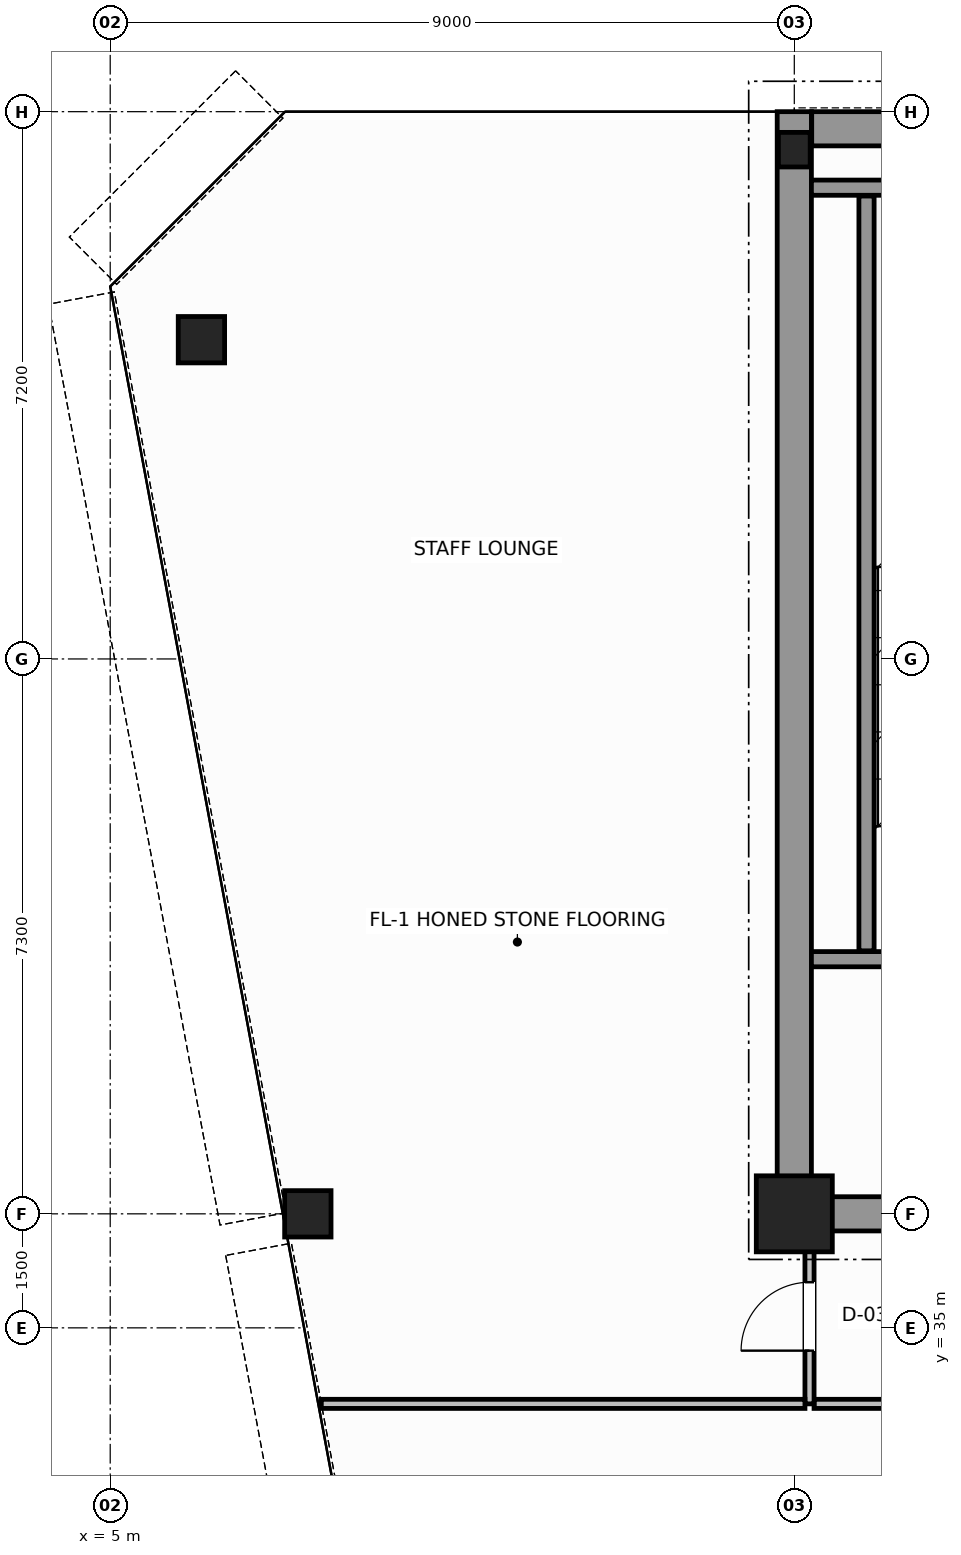
"""IFC4 building model, lengths in metres.
Left out: names, types, materials, properties, quantities, classifications, styles, units other than length and angle.
Written with IfcOpenShell. Run it as: python <this file> out.ifc"""

import sys

from ifc_helpers import new_model, si_unit, direction, frame, frame_2d, origin, origin_2d, place, context, subcontext, project, spatial, rectangle, hollow_circle, i_section, extrude, source, transform, mapped, element, fill, save


model = new_model("IFC4")
c1 = context("Model", 3, precision=1e-05, world=origin(), true_north=direction((0.0, 1.0)))
c2 = subcontext(c1, "Body", "Model", "MODEL_VIEW")
j1 = project(units=[si_unit("LENGTHUNIT", "METRE"), si_unit("PLANEANGLEUNIT", "RADIAN")], contexts=[c1])
p1 = place(None, origin())
s1 = spatial("IfcSite", under=j1, at=p1, CompositionType="ELEMENT")
p2 = place(p1, origin())
s2 = spatial("IfcBuilding", under=s1, at=p2, CompositionType="ELEMENT")
p3 = place(p2, frame((0.0, 0.0, 246.0)))
s3 = spatial("IfcBuildingStorey", under=s2, at=p3, CompositionType="ELEMENT", Elevation=246.0)
m1 = source(origin(), c2, "Body", "SweptSolid", [
    extrude(rectangle(XDim=1.0, YDim=1.0, at=origin_2d()), origin(), (0.0, 0.0, 1.0), 3.8),
])
p4 = place(p3, frame((14.0, 36.5, 0.0), z_axis=(0.0, 0.0, 1.0), x_axis=(1.0, 0.0, 0.0)))
e1 = element("IfcColumn", 1, at=p4, inside=s3, PredefinedType="COLUMN", context=c2, shape_type="MappedRepresentation", body=[
    mapped(m1, transform((0.0, 0.0, 0.0), scale=1.0)),
])
m2 = source(origin(), c2, "Body", "SweptSolid", [
    extrude(i_section(OverallWidth=0.418, OverallDepth=0.455, WebThickness=0.042, FlangeThickness=0.058, FilletRadius=0.015, at=origin_2d()), origin(), (0.0, 0.0, 1.0), 3.8),
])
p5 = place(p3, frame((14.0, 50.5, 0.0), z_axis=(0.0, 0.0, 1.0), x_axis=(1.0, 0.0, 0.0)))
e2 = element("IfcColumn", 2, at=p5, inside=s3, PredefinedType="COLUMN", context=c2, shape_type="MappedRepresentation", body=[
    mapped(m2, transform((0.0, 0.0, 0.0), scale=1.0)),
])
m3 = source(origin(), c2, "Body", "SweptSolid", [
    extrude(hollow_circle(Radius=0.305, WallThickness=0.03, at=origin_2d()), origin(), (0.0, 0.0, 1.0), 3.8),
])
for number, where, z_axis, x_axis in (
    (3, (6.2, 48.0, 0.0), (0.0, 0.0, 1.0), (1.0, 0.0, 0.0)),
    (4, (7.6, 36.5, 0.0), (0.0, 0.0, 1.0), (1.0, 0.0, 0.0)),
):
    element("IfcColumn", number, at=place(p3, frame(where, z_axis=z_axis, x_axis=x_axis)), inside=s3, PredefinedType="COLUMN", context=c2, shape_type="MappedRepresentation", body=[
        mapped(m3, transform((0.0, 0.0, 0.0), scale=1.0)),
    ])
p6 = place(p3, frame((14.229, 50.775, 0.0), z_axis=(0.0, 0.0, 1.0), x_axis=(1.0, 0.0, 0.0)))
e5 = element("IfcWall", 5, at=p6, inside=s3, PredefinedType="SHEAR", context=c2, shape_type="SweptSolid", body=[
    extrude(rectangle(XDim=19.769, YDim=0.45, at=frame_2d((9.885, 0.0))), origin(), (0.0, 0.0, 1.0), 3.8),
])
p7 = place(p3, frame((14.0, 36.5, 0.0), z_axis=(0.0, 0.0, 1.0), x_axis=(0.0, 1.0, 0.0)))
e6 = element("IfcWall", 6, at=p7, inside=s3, PredefinedType="SHEAR", context=c2, shape_type="SweptSolid", body=[
    extrude(rectangle(XDim=14.5, YDim=0.45, at=frame_2d((7.25, 0.0))), origin(), (0.0, 0.0, 1.0), 3.8),
])
p8 = place(p3, frame((14.245, 36.5, 0.0), z_axis=(0.0, 0.0, 1.0), x_axis=(1.0, 0.0, 0.0)))
e7 = element("IfcWall", 7, at=p8, inside=s3, PredefinedType="SHEAR", context=c2, shape_type="SweptSolid", body=[
    extrude(rectangle(XDim=3.955, YDim=0.45, at=frame_2d((1.978, 0.0))), origin(), (0.0, 0.0, 1.0), 2.58),
])
p9 = place(p3, frame((14.225, 39.85, 0.0), z_axis=(0.0, 0.0, 1.0), x_axis=(1.0, 0.0, 0.0)))
e8 = element("IfcWall", 8, at=p9, inside=s3, PredefinedType="SOLIDWALL", context=c2, shape_type="SweptSolid", body=[
    extrude(rectangle(XDim=4.375, YDim=0.2, at=frame_2d((2.188, 0.0))), origin(), (0.0, 0.0, 1.0), 3.8),
])
p10 = place(p9, frame((1.95, 0.0, 0.0)))
e9 = element("IfcOpeningElement", 9, at=p10, cuts=e8, PredefinedType="OPENING", context=c2, shape_type="SweptSolid", body=[
    extrude(rectangle(XDim=1.1, YDim=2.15, at=frame_2d((0.55, 1.075))), frame((0.0, 0.11, 0.0), z_axis=(0.0, -1.0, 0.0), x_axis=(1.0, 0.0, 0.0)), (0.0, 0.0, 1.0), 0.22),
])
p11 = place(p3, frame((14.225, 50.0, 0.0), z_axis=(0.0, 0.0, 1.0), x_axis=(1.0, 0.0, 0.0)))
e10 = element("IfcWall", 10, at=p11, inside=s3, PredefinedType="SOLIDWALL", context=c2, shape_type="SweptSolid", body=[
    extrude(rectangle(XDim=4.375, YDim=0.2, at=frame_2d((2.188, 0.0))), origin(), (0.0, 0.0, 1.0), 3.8),
])
p12 = place(p3, frame((14.95, 39.96, 0.0), z_axis=(0.0, 0.0, 1.0), x_axis=(0.0, 1.0, 0.0)))
e11 = element("IfcWall", 11, at=p12, inside=s3, PredefinedType="SOLIDWALL", context=c2, shape_type="SweptSolid", body=[
    extrude(rectangle(XDim=9.93, YDim=0.2, at=frame_2d((4.965, 0.0))), origin(), (0.0, 0.0, 1.0), 3.8),
])
p13 = place(p3, frame((14.26, 34.0, 0.0), z_axis=(0.0, 0.0, 1.0), x_axis=(1.0, 0.0, 0.0)))
e12 = element("IfcWall", 12, at=p13, inside=s3, PredefinedType="PARTITIONING", context=c2, shape_type="SweptSolid", body=[
    extrude(rectangle(XDim=20.88, YDim=0.12, at=frame_2d((10.44, 0.0))), origin(), (0.0, 0.0, 1.0), 3.58),
])
p14 = place(p3, frame((14.2, 34.0, 0.0), z_axis=(0.0, 0.0, 1.0), x_axis=(0.0, 1.0, 0.0)))
e13 = element("IfcWall", 13, at=p14, inside=s3, PredefinedType="PARTITIONING", context=c2, shape_type="SweptSolid", body=[
    extrude(rectangle(XDim=2.44, YDim=0.12, at=frame_2d((1.22, 0.0))), origin(), (0.0, 0.0, 1.0), 3.58),
])
p15 = place(p14, frame((0.7, 0.0, 0.0)))
e14 = element("IfcOpeningElement", 14, at=p15, cuts=e13, PredefinedType="OPENING", context=c2, shape_type="SweptSolid", body=[
    extrude(rectangle(XDim=0.9, YDim=2.15, at=frame_2d((0.45, 1.075))), frame((0.0, 0.07, 0.0), z_axis=(0.0, -1.0, 0.0), x_axis=(1.0, 0.0, 0.0)), (0.0, 0.0, 1.0), 0.14),
])
p16 = place(p3, frame((7.777, 34.0, 0.0), z_axis=(0.0, 0.0, 1.0), x_axis=(1.0, 0.0, 0.0)))
e15 = element("IfcWall", 15, at=p16, inside=s3, PredefinedType="PARTITIONING", context=c2, shape_type="SweptSolid", body=[
    extrude(rectangle(XDim=6.363, YDim=0.12, at=frame_2d((3.181, 0.0))), origin(), (0.0, 0.0, 1.0), 3.58),
])
m4 = source(origin(), c2, "Body", "SweptSolid", [
    extrude(rectangle(XDim=0.9, YDim=2.15, at=frame_2d((0.45, 1.075))), frame((0.0, 0.025, 0.0), z_axis=(0.0, -1.0, 0.0), x_axis=(1.0, 0.0, 0.0)), (0.0, 0.0, 1.0), 0.05),
])
p17 = place(p15, origin())
e16 = element("IfcDoor", 16, at=p17, inside=s3, OperationType="SINGLE_SWING_LEFT", PredefinedType="DOOR", context=c2, shape_type="MappedRepresentation", body=[
    mapped(m4, transform((0.0, 0.0, 0.0), scale=1.0)),
])
fill(e14, e16)
save(model, sys.argv[1])
